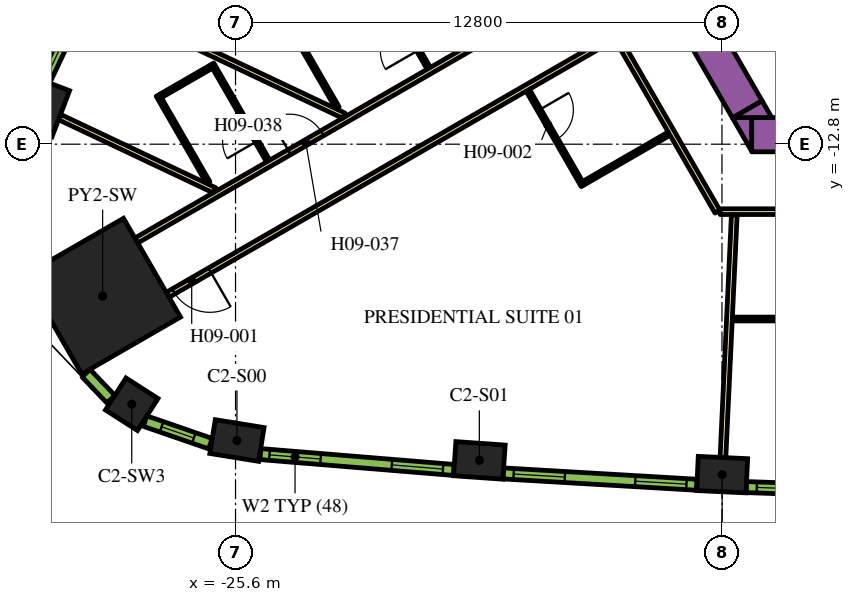
"""IFC4 building model, lengths in metres.
Left out: names, types, materials, properties, quantities, classifications, styles, units other than length and angle.
Written with IfcOpenShell. Run it as: python <this file> out.ifc"""

import sys

from ifc_helpers import new_model, si_unit, direction, frame, frame_2d, origin, origin_2d, place, context, subcontext, project, spatial, polyline, rectangle, outline, extrude, element, fill, save


model = new_model("IFC4")
c1 = context("Model", 3, precision=1e-05, world=origin(), true_north=direction((0.0, 1.0)))
c2 = subcontext(c1, "Body", "Model", "MODEL_VIEW")
j1 = project(units=[si_unit("LENGTHUNIT", "METRE"), si_unit("PLANEANGLEUNIT", "RADIAN")], contexts=[c1])
p1 = place(None, origin())
s1 = spatial("IfcSite", under=j1, at=p1, CompositionType="ELEMENT")
p2 = place(p1, origin())
s2 = spatial("IfcBuilding", under=s1, at=p2, CompositionType="ELEMENT")
p3 = place(p2, frame((0.0, 0.0, 118.8)))
s3 = spatial("IfcBuildingStorey", under=s2, at=p3, CompositionType="ELEMENT", Elevation=118.8)
p4 = place(p3, frame((-29.097, -16.799, 0.0), z_axis=(0.0, 0.0, 1.0), x_axis=(-0.866025403784, -0.5, 0.0)))
e1 = element("IfcColumn", 1, at=p4, inside=s3, PredefinedType="COLUMN", context=c2, shape_type="SweptSolid", body=[
    extrude(rectangle(XDim=3.0, YDim=3.0, at=origin_2d()), origin(), (0.0, 0.0, 1.0), 3.9),
])
for number, where, z_axis, x_axis in (
    (2, (-25.563, -20.597, 0.0), (0.0, 0.0, 1.0), (0.987, -0.159, 0.0)),
    (3, (-19.184, -21.12, 0.0), (0.0, 0.0, 1.0), (0.998, -0.07, 0.0)),
    (4, (-12.795, -21.494, 0.0), (0.0, 0.0, 1.0), (0.999, -0.047, 0.0)),
    (5, (-30.619, -11.839, 0.0), (0.0, 0.0, 1.0), (-0.355, -0.935, 0.0)),
):
    element("IfcColumn", number, at=place(p3, frame(where, z_axis=z_axis, x_axis=x_axis)), inside=s3, PredefinedType="COLUMN", context=c2, shape_type="SweptSolid", body=[
        extrude(rectangle(XDim=1.3, YDim=0.9, at=origin_2d()), origin(), (0.0, 0.0, 1.0), 3.9),
    ])
p5 = place(p3, frame((-28.331, -19.643, 0.0), z_axis=(0.0, 0.0, 1.0), x_axis=(0.841700252504, -0.53994507585, 0.0)))
e6 = element("IfcColumn", 6, at=p5, inside=s3, PredefinedType="COLUMN", context=c2, shape_type="SweptSolid", body=[
    extrude(rectangle(XDim=1.0, YDim=1.0, at=origin_2d()), origin(), (0.0, 0.0, 1.0), 3.9),
])
p6 = place(p3, frame((-12.019, -12.55, 0.0), z_axis=(0.0, 0.0, 1.0), x_axis=(1.0, 0.0, 0.0)))
e7 = element("IfcWall", 7, at=p6, inside=s3, PredefinedType="SOLIDWALL", context=c2, shape_type="SweptSolid", body=[
    extrude(rectangle(XDim=22.083, YDim=0.9, at=frame_2d((11.042, 0.0))), origin(), (0.0, 0.0, 1.0), 3.9),
])
p7 = place(p3, origin())
e8 = element("IfcWall", 8, at=p7, inside=s3, PredefinedType="SOLIDWALL", context=c2, shape_type="SweptSolid", body=[
    extrude(outline(polyline([(-12.529, -12.1), (-12.021, -12.1), (-12.021, -12.98), (-12.529, -12.1)])), origin(), (0.0, 0.0, 1.0), 3.9),
])
p8 = place(p3, frame((-12.134, -11.883, 0.0), z_axis=(0.0, 0.0, 1.0), x_axis=(-0.500005339912, 0.866022320763, 0.0)))
e9 = element("IfcWall", 9, at=p8, inside=s3, PredefinedType="SOLIDWALL", context=c2, shape_type="SweptSolid", body=[
    extrude(rectangle(XDim=9.488, YDim=0.9, at=frame_2d((4.744, 0.0))), origin(), (0.0, 0.0, 1.0), 3.9),
])
e10 = element("IfcWall", 10, at=p7, inside=s3, PredefinedType="SOLIDWALL", context=c2, shape_type="SweptSolid", body=[
    extrude(outline(polyline([(-11.489, -12.1), (-12.505, -12.1), (-11.743, -11.66), (-11.489, -12.1)])), origin(), (0.0, 0.0, 1.0), 3.9),
])
p9 = place(p3, frame((-28.211, -15.335, 0.0), z_axis=(0.0, 0.0, 1.0), x_axis=(0.866025884867, 0.49999916674, 0.0)))
e11 = element("IfcWall", 11, at=p9, inside=s3, PredefinedType="PARTITIONING", context=c2, shape_type="SweptSolid", body=[
    extrude(rectangle(XDim=13.543, YDim=0.15, at=frame_2d((6.772, 0.0))), origin(), (0.0, 0.0, 1.0), 2.75),
])
p10 = place(p9, frame((12.114, 0.0, 0.0)))
e12 = element("IfcOpeningElement", 12, at=p10, cuts=e11, PredefinedType="OPENING", context=c2, shape_type="SweptSolid", body=[
    extrude(rectangle(XDim=1.1, YDim=2.1, at=frame_2d((0.55, 1.05))), frame((0.0, 0.085, 0.0), z_axis=(0.0, -1.0, 0.0), x_axis=(1.0, 0.0, 0.0)), (0.0, 0.0, 1.0), 0.17),
])
p11 = place(p9, frame((4.65, 0.0, 0.0)))
e13 = element("IfcOpeningElement", 13, at=p11, cuts=e11, PredefinedType="OPENING", context=c2, shape_type="SweptSolid", body=[
    extrude(rectangle(XDim=1.0, YDim=2.1, at=frame_2d((0.5, 1.05))), frame((0.0, 0.085, 0.0), z_axis=(0.0, -1.0, 0.0), x_axis=(1.0, 0.0, 0.0)), (0.0, 0.0, 1.0), 0.17),
])
p12 = place(p3, frame((-15.587, -9.952, 0.0), z_axis=(0.0, 0.0, 1.0), x_axis=(-0.866017869832, -0.500013048961, 0.0)))
e14 = element("IfcWall", 14, at=p12, inside=s3, PredefinedType="PARTITIONING", context=c2, shape_type="SweptSolid", body=[
    extrude(rectangle(XDim=13.624, YDim=0.15, at=frame_2d((6.812, 0.0))), origin(), (0.0, 0.0, 1.0), 2.75),
])
p13 = place(p12, frame((12.344, 0.0, 0.0)))
e15 = element("IfcOpeningElement", 15, at=p13, cuts=e14, PredefinedType="OPENING", context=c2, shape_type="SweptSolid", body=[
    extrude(rectangle(XDim=1.1, YDim=2.1, at=frame_2d((0.55, 1.05))), frame((0.0, 0.085, 0.0), z_axis=(0.0, -1.0, 0.0), x_axis=(1.0, 0.0, 0.0)), (0.0, 0.0, 1.0), 0.17),
])
p14 = place(p3, frame((-12.918, -14.575, 0.0), z_axis=(0.0, 0.0, 1.0), x_axis=(-0.500009150678, 0.866020120573, 0.0)))
e16 = element("IfcWall", 16, at=p14, inside=s3, PredefinedType="PARTITIONING", context=c2, shape_type="SweptSolid", body=[
    extrude(rectangle(XDim=5.258, YDim=0.15, at=frame_2d((2.629, 0.0))), origin(), (0.0, 0.0, 1.0), 2.75),
])
p15 = place(p3, frame((12.918, -14.575, 0.0), z_axis=(0.0, 0.0, 1.0), x_axis=(-1.0, 0.0, 0.0)))
e17 = element("IfcWall", 17, at=p15, inside=s3, PredefinedType="PARTITIONING", context=c2, shape_type="SweptSolid", body=[
    extrude(rectangle(XDim=25.766, YDim=0.15, at=frame_2d((12.883, 0.0))), origin(), (0.0, 0.0, 1.0), 2.75),
])
p16 = place(p15, frame((16.189, 0.0, 0.0)))
e18 = element("IfcOpeningElement", 18, at=p16, cuts=e17, PredefinedType="OPENING", context=c2, shape_type="SweptSolid", body=[
    extrude(rectangle(XDim=1.0, YDim=2.1, at=frame_2d((0.5, 1.05))), frame((0.0, 0.085, 0.0), z_axis=(0.0, -1.0, 0.0), x_axis=(1.0, 0.0, 0.0)), (0.0, 0.0, 1.0), 0.17),
])
p17 = place(p15, frame((14.882, 0.0, 0.0)))
e19 = element("IfcOpeningElement", 19, at=p17, cuts=e17, PredefinedType="OPENING", context=c2, shape_type="SweptSolid", body=[
    extrude(rectangle(XDim=1.0, YDim=2.1, at=frame_2d((0.5, 1.05))), frame((0.0, 0.085, 0.0), z_axis=(0.0, -1.0, 0.0), x_axis=(1.0, 0.0, 0.0)), (0.0, 0.0, 1.0), 0.17),
])
p18 = place(p15, frame((0.596, 0.0, 0.0)))
e20 = element("IfcOpeningElement", 20, at=p18, cuts=e17, PredefinedType="OPENING", context=c2, shape_type="SweptSolid", body=[
    extrude(rectangle(XDim=1.1, YDim=2.1, at=frame_2d((0.55, 1.05))), frame((0.0, 0.085, 0.0), z_axis=(0.0, -1.0, 0.0), x_axis=(1.0, 0.0, 0.0)), (0.0, 0.0, 1.0), 0.17),
])
p19 = place(p3, frame((-30.231, -12.085, 0.0), z_axis=(0.0, 0.0, 1.0), x_axis=(0.904001132572, -0.427530060122, 0.0)))
e21 = element("IfcWall", 21, at=p19, inside=s3, PredefinedType="PARTITIONING", context=c2, shape_type="SweptSolid", body=[
    extrude(rectangle(XDim=4.51, YDim=0.15, at=frame_2d((2.255, 0.0))), origin(), (0.0, 0.0, 1.0), 2.75),
])
p20 = place(p3, frame((-29.406, -8.901, 0.0), z_axis=(0.0, 0.0, 1.0), x_axis=(0.904002363742, -0.427527456836, 0.0)))
e22 = element("IfcWall", 22, at=p20, inside=s3, PredefinedType="PARTITIONING", context=c2, shape_type="SweptSolid", body=[
    extrude(rectangle(XDim=7.362, YDim=0.15, at=frame_2d((3.681, 0.0))), origin(), (0.0, 0.0, 1.0), 2.75),
])
p21 = place(p3, frame((-12.774, -21.045, 0.0), z_axis=(0.0, 0.0, 1.0), x_axis=(0.046750341626, 0.998906605023, 0.0)))
e23 = element("IfcWall", 23, at=p21, inside=s3, PredefinedType="PARTITIONING", context=c2, shape_type="SweptSolid", body=[
    extrude(rectangle(XDim=6.392, YDim=0.15, at=frame_2d((3.196, 0.0))), origin(), (0.0, 0.0, 1.0), 2.75),
])
p22 = place(p3, frame((-17.91, -11.38, 0.0), z_axis=(0.0, 0.0, 1.0), x_axis=(0.499987231761, -0.866032775405, 0.0)))
e24 = element("IfcWall", 24, at=p22, inside=s3, PredefinedType="PARTITIONING", context=c2, shape_type="SweptSolid", body=[
    extrude(rectangle(XDim=2.9, YDim=0.1, at=frame_2d((1.45, 0.0))), origin(), (0.0, 0.0, 1.0), 2.75),
])
p23 = place(p22, frame((0.6, 0.0, 0.0)))
e25 = element("IfcOpeningElement", 25, at=p23, cuts=e24, PredefinedType="OPENING", context=c2, shape_type="SweptSolid", body=[
    extrude(rectangle(XDim=0.9, YDim=2.1, at=frame_2d((0.45, 1.05))), frame((0.0, 0.06, 0.0), z_axis=(0.0, -1.0, 0.0), x_axis=(1.0, 0.0, 0.0)), (0.0, 0.0, 1.0), 0.12),
])
p24 = place(p3, frame((-16.442, -13.823, 0.0), z_axis=(0.0, 0.0, 1.0), x_axis=(0.866021400173, 0.500006934395, 0.0)))
e26 = element("IfcWall", 26, at=p24, inside=s3, PredefinedType="PARTITIONING", context=c2, shape_type="SweptSolid", body=[
    extrude(rectangle(XDim=2.6, YDim=0.1, at=frame_2d((1.3, 0.0))), origin(), (0.0, 0.0, 1.0), 2.75),
])
p25 = place(p3, frame((-10.072, -17.4, 0.0), z_axis=(0.0, 0.0, 1.0), x_axis=(-1.0, 0.0, 0.0)))
e27 = element("IfcWall", 27, at=p25, inside=s3, PredefinedType="PARTITIONING", context=c2, shape_type="SweptSolid", body=[
    extrude(rectangle(XDim=2.45, YDim=0.1, at=frame_2d((1.225, 0.0))), origin(), (0.0, 0.0, 1.0), 2.75),
])
p26 = place(p3, frame((-20.515, -10.805, 0.0), z_axis=(0.0, 0.0, 1.0), x_axis=(-0.49994636267, 0.866056369097, 0.0)))
e28 = element("IfcWall", 28, at=p26, inside=s3, PredefinedType="PARTITIONING", context=c2, shape_type="SweptSolid", body=[
    extrude(rectangle(XDim=2.8, YDim=0.1, at=frame_2d((1.4, 0.0))), origin(), (0.0, 0.0, 1.0), 2.75),
])
p27 = place(p26, frame((0.55, 0.0, 0.0)))
e29 = element("IfcOpeningElement", 29, at=p27, cuts=e28, PredefinedType="OPENING", context=c2, shape_type="SweptSolid", body=[
    extrude(rectangle(XDim=1.0, YDim=2.1, at=frame_2d((0.5, 1.05))), frame((0.0, 0.06, 0.0), z_axis=(0.0, -1.0, 0.0), x_axis=(1.0, 0.0, 0.0)), (0.0, 0.0, 1.0), 0.12),
])
p28 = place(p3, frame((-22.916, -11.845, 0.0), z_axis=(0.0, 0.0, 1.0), x_axis=(-0.500004234368, 0.866022959057, 0.0)))
e30 = element("IfcWall", 30, at=p28, inside=s3, PredefinedType="PARTITIONING", context=c2, shape_type="SweptSolid", body=[
    extrude(rectangle(XDim=2.5, YDim=0.1, at=frame_2d((1.25, 0.0))), origin(), (0.0, 0.0, 1.0), 2.75),
])
p29 = place(p3, frame((-24.74, -13.244, 0.0), z_axis=(0.0, 0.0, 1.0), x_axis=(-0.500037662692, 0.866003658127, 0.0)))
e31 = element("IfcWall", 31, at=p29, inside=s3, PredefinedType="PARTITIONING", context=c2, shape_type="SweptSolid", body=[
    extrude(rectangle(XDim=2.95, YDim=0.1, at=frame_2d((1.475, 0.0))), origin(), (0.0, 0.0, 1.0), 2.75),
])
p30 = place(p29, frame((0.6, 0.0, 0.0)))
e32 = element("IfcOpeningElement", 32, at=p30, cuts=e31, PredefinedType="OPENING", context=c2, shape_type="SweptSolid", body=[
    extrude(rectangle(XDim=0.9, YDim=2.1, at=frame_2d((0.45, 1.05))), frame((0.0, 0.06, 0.0), z_axis=(0.0, -1.0, 0.0), x_axis=(1.0, 0.0, 0.0)), (0.0, 0.0, 1.0), 0.12),
])
p31 = place(p3, frame((-26.233, -10.758, 0.0), z_axis=(0.0, 0.0, 1.0), x_axis=(-0.866043940782, -0.499967891604, 0.0)))
e33 = element("IfcWall", 33, at=p31, inside=s3, PredefinedType="PARTITIONING", context=c2, shape_type="SweptSolid", body=[
    extrude(rectangle(XDim=1.55, YDim=0.1, at=frame_2d((0.775, 0.0))), origin(), (0.0, 0.0, 1.0), 2.75),
])
p32 = place(p3, frame((-26.319, -13.81, 0.0), z_axis=(0.0, 0.0, 1.0), x_axis=(-0.499953715521, 0.866052124492, 0.0)))
e34 = element("IfcWall", 34, at=p32, inside=s3, PredefinedType="PARTITIONING", context=c2, shape_type="SweptSolid", body=[
    extrude(rectangle(XDim=2.65, YDim=0.1, at=frame_2d((1.325, 0.0))), origin(), (0.0, 0.0, 1.0), 2.75),
])
p33 = place(p3, frame((-24.946, -20.954, 0.0), z_axis=(0.0, 0.0, 1.0), x_axis=(0.99665273362, -0.081751627308, 0.0)))
e35 = element("IfcWall", 35, at=p33, inside=s3, PredefinedType="SOLIDWALL", context=c2, shape_type="SweptSolid", body=[
    extrude(rectangle(XDim=5.107, YDim=0.29, at=frame_2d((2.553, 0.0))), origin(), (0.0, 0.0, 1.0), 3.65),
])
p34 = place(p33, frame((0.24, 0.0, 0.9)))
e36 = element("IfcOpeningElement", 36, at=p34, cuts=e35, PredefinedType="OPENING", context=c2, shape_type="SweptSolid", body=[
    extrude(rectangle(XDim=1.35, YDim=2.15, at=frame_2d((0.675, 1.075))), frame((0.0, 0.155, 0.0), z_axis=(0.0, -1.0, 0.0), x_axis=(1.0, 0.0, 0.0)), (0.0, 0.0, 1.0), 0.31),
])
p35 = place(p33, frame((3.471, 0.0, 0.9)))
e37 = element("IfcOpeningElement", 37, at=p35, cuts=e35, PredefinedType="OPENING", context=c2, shape_type="SweptSolid", body=[
    extrude(rectangle(XDim=1.35, YDim=2.15, at=frame_2d((0.675, 1.075))), frame((0.0, 0.155, 0.0), z_axis=(0.0, -1.0, 0.0), x_axis=(1.0, 0.0, 0.0)), (0.0, 0.0, 1.0), 0.31),
])
p36 = place(p3, frame((-18.553, -21.463, 0.0), z_axis=(0.0, 0.0, 1.0), x_axis=(0.998290511436, -0.058447025388, 0.0)))
e38 = element("IfcWall", 38, at=p36, inside=s3, PredefinedType="SOLIDWALL", context=c2, shape_type="SweptSolid", body=[
    extrude(rectangle(XDim=5.1, YDim=0.29, at=frame_2d((2.55, 0.0))), origin(), (0.0, 0.0, 1.0), 3.65),
])
p37 = place(p36, frame((0.273, 0.0, 0.9)))
e39 = element("IfcOpeningElement", 39, at=p37, cuts=e38, PredefinedType="OPENING", context=c2, shape_type="SweptSolid", body=[
    extrude(rectangle(XDim=1.35, YDim=2.15, at=frame_2d((0.675, 1.075))), frame((0.0, 0.155, 0.0), z_axis=(0.0, -1.0, 0.0), x_axis=(1.0, 0.0, 0.0)), (0.0, 0.0, 1.0), 0.31),
])
p38 = place(p36, frame((3.478, 0.0, 0.9)))
e40 = element("IfcOpeningElement", 40, at=p38, cuts=e38, PredefinedType="OPENING", context=c2, shape_type="SweptSolid", body=[
    extrude(rectangle(XDim=1.35, YDim=2.15, at=frame_2d((0.675, 1.075))), frame((0.0, 0.155, 0.0), z_axis=(0.0, -1.0, 0.0), x_axis=(1.0, 0.0, 0.0)), (0.0, 0.0, 1.0), 0.31),
])
p39 = place(p3, frame((-12.157, -21.822, 0.0), z_axis=(0.0, 0.0, 1.0), x_axis=(0.999385993957, -0.035037623812, 0.0)))
e41 = element("IfcWall", 41, at=p39, inside=s3, PredefinedType="SOLIDWALL", context=c2, shape_type="SweptSolid", body=[
    extrude(rectangle(XDim=5.101, YDim=0.29, at=frame_2d((2.55, 0.0))), origin(), (0.0, 0.0, 1.0), 3.65),
])
p40 = place(p39, frame((0.273, 0.0, 0.9)))
e42 = element("IfcOpeningElement", 42, at=p40, cuts=e41, PredefinedType="OPENING", context=c2, shape_type="SweptSolid", body=[
    extrude(rectangle(XDim=1.35, YDim=2.15, at=frame_2d((0.675, 1.075))), frame((0.0, 0.155, 0.0), z_axis=(0.0, -1.0, 0.0), x_axis=(1.0, 0.0, 0.0)), (0.0, 0.0, 1.0), 0.31),
])
p41 = place(p39, frame((3.478, 0.0, 0.9)))
e43 = element("IfcOpeningElement", 43, at=p41, cuts=e41, PredefinedType="OPENING", context=c2, shape_type="SweptSolid", body=[
    extrude(rectangle(XDim=1.35, YDim=2.15, at=frame_2d((0.675, 1.075))), frame((0.0, 0.155, 0.0), z_axis=(0.0, -1.0, 0.0), x_axis=(1.0, 0.0, 0.0)), (0.0, 0.0, 1.0), 0.31),
])
p42 = place(p3, frame((-28.436, -6.511, 0.0), z_axis=(0.0, 0.0, 1.0), x_axis=(-0.427543726596, -0.903994669148, 0.0)))
e44 = element("IfcWall", 44, at=p42, inside=s3, PredefinedType="SOLIDWALL", context=c2, shape_type="SweptSolid", body=[
    extrude(rectangle(XDim=5.107, YDim=0.29, at=frame_2d((2.553, 0.0))), origin(), (0.0, 0.0, 1.0), 3.65),
])
p43 = place(p42, frame((0.285, 0.0, 0.9)))
e45 = element("IfcOpeningElement", 45, at=p43, cuts=e44, PredefinedType="OPENING", context=c2, shape_type="SweptSolid", body=[
    extrude(rectangle(XDim=1.35, YDim=2.15, at=frame_2d((0.675, 1.075))), frame((0.0, 0.155, 0.0), z_axis=(0.0, -1.0, 0.0), x_axis=(1.0, 0.0, 0.0)), (0.0, 0.0, 1.0), 0.31),
])
p44 = place(p42, frame((3.516, 0.0, 0.9)))
e46 = element("IfcOpeningElement", 46, at=p44, cuts=e44, PredefinedType="OPENING", context=c2, shape_type="SweptSolid", body=[
    extrude(rectangle(XDim=1.35, YDim=2.15, at=frame_2d((0.675, 1.075))), frame((0.0, 0.155, 0.0), z_axis=(0.0, -1.0, 0.0), x_axis=(1.0, 0.0, 0.0)), (0.0, 0.0, 1.0), 0.31),
])
p45 = place(p3, frame((-29.534, -18.824, 0.0), z_axis=(0.0, 0.0, 1.0), x_axis=(0.690414427296, -0.723414071319, 0.0)))
e47 = element("IfcWall", 47, at=p45, inside=s3, PredefinedType="SOLIDWALL", context=c2, shape_type="SweptSolid", body=[
    extrude(rectangle(XDim=0.947, YDim=0.29, at=frame_2d((0.474, 0.0))), origin(), (0.0, 0.0, 1.0), 3.65),
])
p46 = place(p3, frame((-27.981, -20.086, 0.0), z_axis=(0.0, 0.0, 1.0), x_axis=(0.945385815453, -0.325953462844, 0.0)))
e48 = element("IfcWall", 48, at=p46, inside=s3, PredefinedType="SOLIDWALL", context=c2, shape_type="SweptSolid", body=[
    extrude(rectangle(XDim=1.819, YDim=0.29, at=frame_2d((0.91, 0.0))), origin(), (0.0, 0.0, 1.0), 3.65),
])
p47 = place(p46, frame((0.46, 0.0, 0.9)))
e49 = element("IfcOpeningElement", 49, at=p47, cuts=e48, PredefinedType="OPENING", context=c2, shape_type="SweptSolid", body=[
    extrude(rectangle(XDim=0.9, YDim=2.15, at=frame_2d((0.45, 1.075))), frame((0.0, 0.155, 0.0), z_axis=(0.0, -1.0, 0.0), x_axis=(1.0, 0.0, 0.0)), (0.0, 0.0, 1.0), 0.31),
])
p48 = place(p13, origin())
e50 = element("IfcDoor", 50, at=p48, inside=s3, OperationType="SINGLE_SWING_RIGHT", PredefinedType="DOOR", context=c2, shape_type="SweptSolid", body=[
    extrude(rectangle(XDim=1.1, YDim=2.1, at=frame_2d((0.55, 1.05))), frame((0.0, 0.025, 0.0), z_axis=(0.0, -1.0, 0.0), x_axis=(1.0, 0.0, 0.0)), (0.0, 0.0, 1.0), 0.05),
])
fill(e15, e50)
p49 = place(p23, origin())
e51 = element("IfcDoor", 51, at=p49, inside=s3, OperationType="SINGLE_SWING_LEFT", PredefinedType="DOOR", context=c2, shape_type="SweptSolid", body=[
    extrude(rectangle(XDim=0.9, YDim=2.1, at=frame_2d((0.45, 1.05))), frame((0.0, 0.025, 0.0), z_axis=(0.0, -1.0, 0.0), x_axis=(1.0, 0.0, 0.0)), (0.0, 0.0, 1.0), 0.05),
])
fill(e25, e51)
p50 = place(p11, origin())
e52 = element("IfcDoor", 52, at=p50, inside=s3, OperationType="SINGLE_SWING_RIGHT", PredefinedType="DOOR", context=c2, shape_type="SweptSolid", body=[
    extrude(rectangle(XDim=1.0, YDim=2.1, at=frame_2d((0.5, 1.05))), frame((0.0, 0.025, 0.0), z_axis=(0.0, -1.0, 0.0), x_axis=(1.0, 0.0, 0.0)), (0.0, 0.0, 1.0), 0.05),
])
fill(e13, e52)
p51 = place(p30, origin())
e53 = element("IfcDoor", 53, at=p51, inside=s3, OperationType="SINGLE_SWING_LEFT", PredefinedType="DOOR", context=c2, shape_type="SweptSolid", body=[
    extrude(rectangle(XDim=0.9, YDim=2.1, at=frame_2d((0.45, 1.05))), frame((0.0, 0.025, 0.0), z_axis=(0.0, -1.0, 0.0), x_axis=(1.0, 0.0, 0.0)), (0.0, 0.0, 1.0), 0.05),
])
fill(e32, e53)
p52 = place(p34, origin())
e54 = element("IfcWindow", 54, at=p52, inside=s3, PartitioningType="DOUBLE_PANEL_VERTICAL", PredefinedType="WINDOW", context=c2, shape_type="SweptSolid", body=[
    extrude(rectangle(XDim=1.35, YDim=2.15, at=frame_2d((0.675, 1.075))), frame((0.0, 0.015, 0.0), z_axis=(0.0, -1.0, 0.0), x_axis=(1.0, 0.0, 0.0)), (0.0, 0.0, 1.0), 0.06),
])
fill(e36, e54)
p53 = place(p35, origin())
e55 = element("IfcWindow", 55, at=p53, inside=s3, PartitioningType="DOUBLE_PANEL_VERTICAL", PredefinedType="WINDOW", context=c2, shape_type="SweptSolid", body=[
    extrude(rectangle(XDim=1.35, YDim=2.15, at=frame_2d((0.675, 1.075))), frame((0.0, 0.015, 0.0), z_axis=(0.0, -1.0, 0.0), x_axis=(1.0, 0.0, 0.0)), (0.0, 0.0, 1.0), 0.06),
])
fill(e37, e55)
p54 = place(p37, origin())
e56 = element("IfcWindow", 56, at=p54, inside=s3, PartitioningType="DOUBLE_PANEL_VERTICAL", PredefinedType="WINDOW", context=c2, shape_type="SweptSolid", body=[
    extrude(rectangle(XDim=1.35, YDim=2.15, at=frame_2d((0.675, 1.075))), frame((0.0, 0.015, 0.0), z_axis=(0.0, -1.0, 0.0), x_axis=(1.0, 0.0, 0.0)), (0.0, 0.0, 1.0), 0.06),
])
fill(e39, e56)
p55 = place(p38, origin())
e57 = element("IfcWindow", 57, at=p55, inside=s3, PartitioningType="DOUBLE_PANEL_VERTICAL", PredefinedType="WINDOW", context=c2, shape_type="SweptSolid", body=[
    extrude(rectangle(XDim=1.35, YDim=2.15, at=frame_2d((0.675, 1.075))), frame((0.0, 0.015, 0.0), z_axis=(0.0, -1.0, 0.0), x_axis=(1.0, 0.0, 0.0)), (0.0, 0.0, 1.0), 0.06),
])
fill(e40, e57)
p56 = place(p40, origin())
e58 = element("IfcWindow", 58, at=p56, inside=s3, PartitioningType="DOUBLE_PANEL_VERTICAL", PredefinedType="WINDOW", context=c2, shape_type="SweptSolid", body=[
    extrude(rectangle(XDim=1.35, YDim=2.15, at=frame_2d((0.675, 1.075))), frame((0.0, 0.015, 0.0), z_axis=(0.0, -1.0, 0.0), x_axis=(1.0, 0.0, 0.0)), (0.0, 0.0, 1.0), 0.06),
])
fill(e42, e58)
p57 = place(p44, origin())
e59 = element("IfcWindow", 59, at=p57, inside=s3, PartitioningType="DOUBLE_PANEL_VERTICAL", PredefinedType="WINDOW", context=c2, shape_type="SweptSolid", body=[
    extrude(rectangle(XDim=1.35, YDim=2.15, at=frame_2d((0.675, 1.075))), frame((0.0, 0.015, 0.0), z_axis=(0.0, -1.0, 0.0), x_axis=(1.0, 0.0, 0.0)), (0.0, 0.0, 1.0), 0.06),
])
fill(e46, e59)
p58 = place(p47, origin())
e60 = element("IfcWindow", 60, at=p58, inside=s3, PartitioningType="SINGLE_PANEL", PredefinedType="WINDOW", context=c2, shape_type="SweptSolid", body=[
    extrude(rectangle(XDim=0.9, YDim=2.15, at=frame_2d((0.45, 1.075))), frame((0.0, 0.015, 0.0), z_axis=(0.0, -1.0, 0.0), x_axis=(1.0, 0.0, 0.0)), (0.0, 0.0, 1.0), 0.06),
])
fill(e49, e60)
save(model, sys.argv[1])
